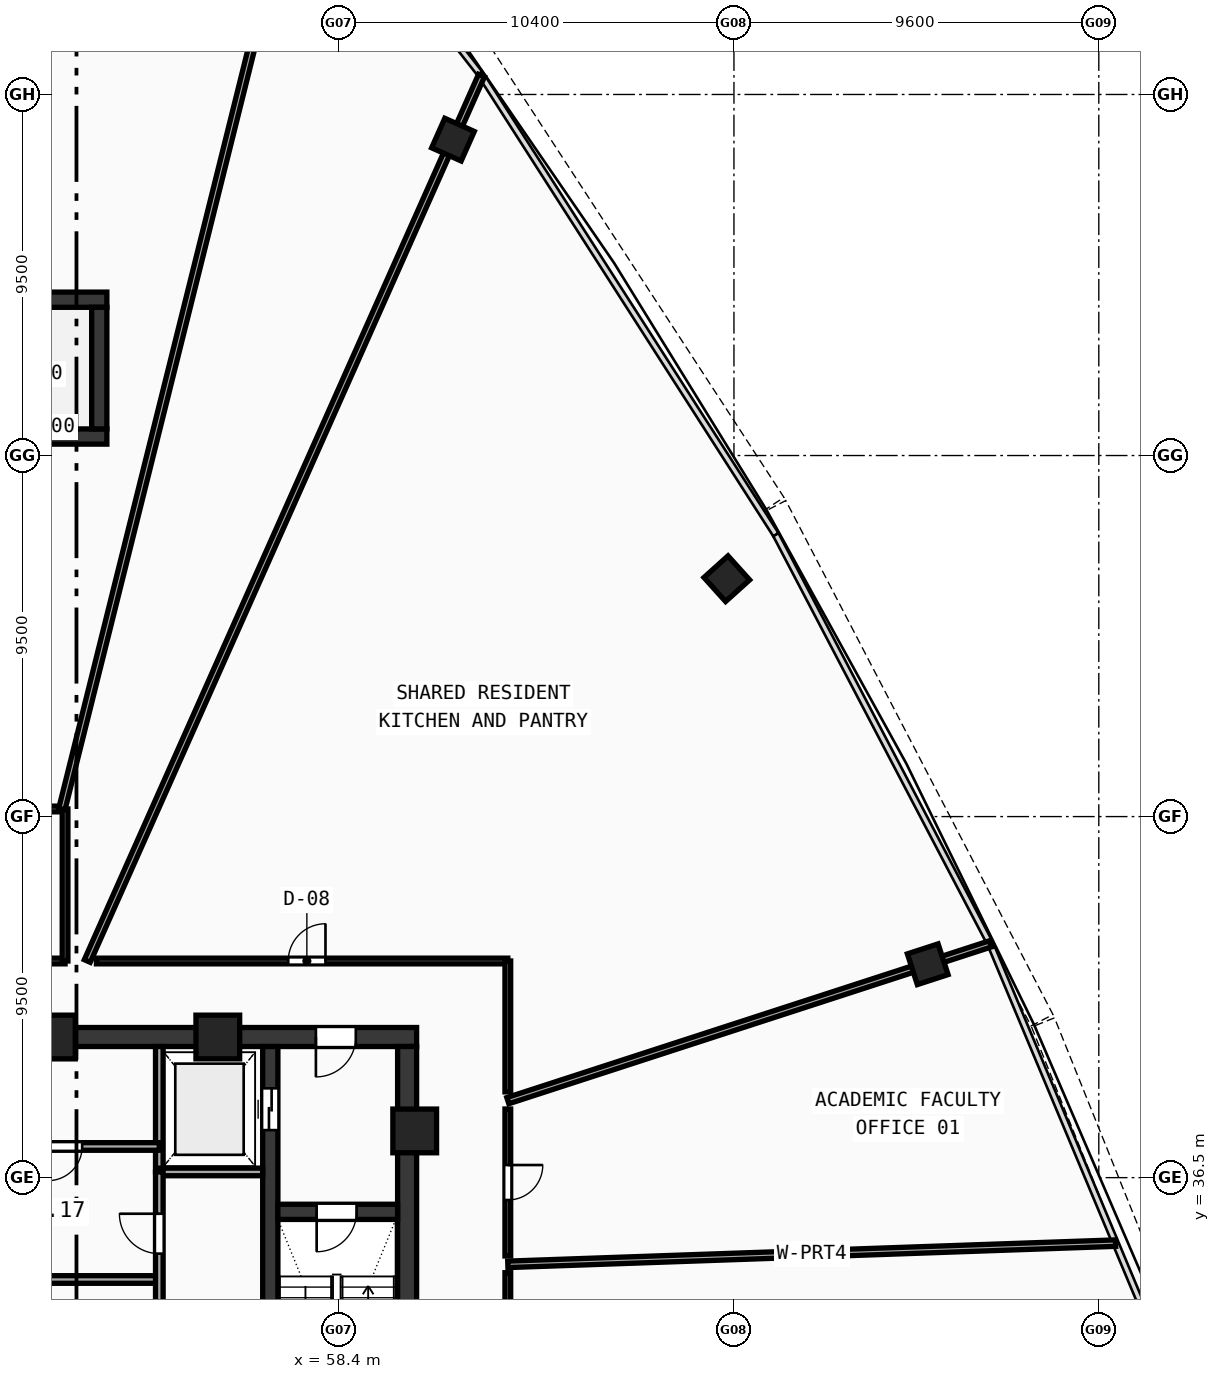
"""IFC4 building model, lengths in metres.
Left out: names, types, materials, properties, quantities, classifications, styles, units other than length and angle.
Written with IfcOpenShell. Run it as: python <this file> out.ifc"""

import sys

from ifc_helpers import new_model, si_unit, direction, frame, frame_2d, origin, origin_with_axes, origin_2d, place, context, subcontext, project, spatial, rectangle, hollow_rectangle, extrude, source, transform, mapped, element, fill, save


model = new_model("IFC4")
c1 = context("Model", 3, precision=1e-05, world=origin(), true_north=direction((0.0, 1.0)))
c2 = subcontext(c1, "Body", "Model", "MODEL_VIEW")
j1 = project(units=[si_unit("LENGTHUNIT", "METRE"), si_unit("PLANEANGLEUNIT", "RADIAN")], contexts=[c1])
p1 = place(None, origin())
s1 = spatial("IfcSite", under=j1, at=p1, CompositionType="ELEMENT")
p2 = place(p1, origin())
s2 = spatial("IfcBuilding", under=s1, at=p2, CompositionType="ELEMENT")
p3 = place(p2, frame((0.0, 0.0, 255.72)))
s3 = spatial("IfcBuildingStorey", under=s2, at=p3, CompositionType="ELEMENT", Elevation=255.72)
p4 = place(p3, frame((49.2, 40.2, 0.0), z_axis=(0.0, 0.0, 1.0), x_axis=(1.0, 0.0, 0.0)))
e1 = element("IfcWall", 1, at=p4, inside=s3, PredefinedType="SHEAR", context=c2, shape_type="SweptSolid", body=[
    extrude(rectangle(XDim=11.25, YDim=0.5, at=frame_2d((5.625, 0.0))), origin(), (0.0, 0.0, 1.0), 3.47),
])
p5 = place(p4, frame((8.6, 0.0, 0.0)))
e2 = element("IfcOpeningElement", 2, at=p5, cuts=e1, PredefinedType="OPENING", context=c2, shape_type="SweptSolid", body=[
    extrude(rectangle(XDim=1.05, YDim=2.1, at=frame_2d((0.525, 1.05))), frame((0.0, 0.26, 0.0), z_axis=(0.0, -1.0, 0.0), x_axis=(1.0, 0.0, 0.0)), (0.0, 0.0, 1.0), 0.52),
])
p6 = place(p3, frame((60.2, 27.75, 0.0), z_axis=(0.0, 0.0, 1.0), x_axis=(0.0, 1.0, 0.0)))
e3 = element("IfcWall", 3, at=p6, inside=s3, PredefinedType="SHEAR", context=c2, shape_type="SweptSolid", body=[
    extrude(rectangle(XDim=12.2, YDim=0.5, at=frame_2d((6.1, 0.0))), origin(), (0.0, 0.0, 1.0), 3.47),
])
p7 = place(p3, frame((56.6, 27.75, 0.0), z_axis=(0.0, 0.0, 1.0), x_axis=(0.0, 1.0, 0.0)))
e4 = element("IfcWall", 4, at=p7, inside=s3, PredefinedType="SHEAR", context=c2, shape_type="SweptSolid", body=[
    extrude(rectangle(XDim=12.2, YDim=0.4, at=frame_2d((6.1, 0.0))), origin(), (0.0, 0.0, 1.0), 3.47),
])
p8 = place(p7, frame((10.0, 0.0, 0.0)))
e5 = element("IfcOpeningElement", 5, at=p8, cuts=e4, PredefinedType="OPENING", context=c2, shape_type="SweptSolid", body=[
    extrude(rectangle(XDim=1.1, YDim=2.1, at=frame_2d((0.55, 1.05))), frame((0.0, 0.21, 0.0), z_axis=(0.0, -1.0, 0.0), x_axis=(1.0, 0.0, 0.0)), (0.0, 0.0, 1.0), 0.42),
])
p9 = place(p3, frame((56.8, 35.6, 0.0), z_axis=(0.0, 0.0, 1.0), x_axis=(1.0, 0.0, 0.0)))
e6 = element("IfcWall", 6, at=p9, inside=s3, PredefinedType="SHEAR", context=c2, shape_type="SweptSolid", body=[
    extrude(rectangle(XDim=3.15, YDim=0.4, at=frame_2d((1.575, 0.0))), origin(), (0.0, 0.0, 1.0), 3.47),
])
p10 = place(p9, frame((1.02, 0.0, 0.0)))
e7 = element("IfcOpeningElement", 7, at=p10, cuts=e6, PredefinedType="OPENING", context=c2, shape_type="SweptSolid", body=[
    extrude(rectangle(XDim=1.05, YDim=2.1, at=frame_2d((0.525, 1.05))), frame((0.0, 0.21, 0.0), z_axis=(0.0, -1.0, 0.0), x_axis=(1.0, 0.0, 0.0)), (0.0, 0.0, 1.0), 0.42),
])
p11 = place(p3, frame((43.8, 59.6, 0.0), z_axis=(0.0, 0.0, 1.0), x_axis=(1.0, 0.0, 0.0)))
e8 = element("IfcWall", 8, at=p11, inside=s3, PredefinedType="SHEAR", context=c2, shape_type="SweptSolid", body=[
    extrude(rectangle(XDim=8.5, YDim=0.4, at=frame_2d((4.25, 0.0))), origin(), (0.0, 0.0, 1.0), 3.47),
])
p12 = place(p3, frame((43.8, 56.0, 0.0), z_axis=(0.0, 0.0, 1.0), x_axis=(1.0, 0.0, 0.0)))
e9 = element("IfcWall", 9, at=p12, inside=s3, PredefinedType="SHEAR", context=c2, shape_type="SweptSolid", body=[
    extrude(rectangle(XDim=8.5, YDim=0.4, at=frame_2d((4.25, 0.0))), origin(), (0.0, 0.0, 1.0), 3.47),
])
p13 = place(p12, frame((0.62, 0.0, 0.0)))
e10 = element("IfcOpeningElement", 10, at=p13, cuts=e9, PredefinedType="OPENING", context=c2, shape_type="SweptSolid", body=[
    extrude(rectangle(XDim=1.05, YDim=2.1, at=frame_2d((0.525, 1.05))), frame((0.0, 0.21, 0.0), z_axis=(0.0, -1.0, 0.0), x_axis=(1.0, 0.0, 0.0)), (0.0, 0.0, 1.0), 0.42),
])
p14 = place(p3, frame((52.1, 56.2, 0.0), z_axis=(0.0, 0.0, 1.0), x_axis=(0.0, 1.0, 0.0)))
e11 = element("IfcWall", 11, at=p14, inside=s3, PredefinedType="SHEAR", context=c2, shape_type="SweptSolid", body=[
    extrude(rectangle(XDim=3.2, YDim=0.4, at=frame_2d((1.6, 0.0))), origin(), (0.0, 0.0, 1.0), 3.47),
])
m1 = source(origin(), c2, "Body", "SweptSolid", [
    extrude(hollow_rectangle(XDim=1.15, YDim=1.15, WallThickness=0.048, at=origin_2d()), origin(), (0.0, 0.0, 1.0), 3.73),
])
for number, where, z_axis, x_axis in (
    (12, (60.4, 37.729, -0.26), (0.0, 0.0, 1.0), (1.0, 0.0, 0.0)),
    (13, (55.219, 40.2, -0.26), (0.0, 0.0, 1.0), (1.0, 0.0, 0.0)),
    (14, (50.894, 40.2, -0.26), (0.0, 0.0, 1.0), (1.0, 0.0, 0.0)),
):
    element("IfcColumn", number, at=place(p3, frame(where, z_axis=z_axis, x_axis=x_axis)), inside=s3, PredefinedType="COLUMN", context=c2, shape_type="MappedRepresentation", body=[
        mapped(m1, transform((0.0, 0.0, 0.0), scale=1.0)),
    ])
m2 = source(origin(), c2, "Body", "SweptSolid", [
    extrude(hollow_rectangle(XDim=0.85, YDim=0.85, WallThickness=0.034, at=origin_2d()), origin(), (0.0, 0.0, 1.0), 3.73),
])
for number, where, z_axis, x_axis in (
    (15, (73.899, 42.115, -0.26), (0.0, 0.0, 1.0), (-0.309, 0.951, 0.0)),
    (16, (68.612, 52.259, -0.26), (0.0, 0.0, 1.0), (-0.669, 0.743, 0.0)),
    (17, (61.407, 63.812, -0.26), (0.0, 0.0, 1.0), (-0.914, 0.407, 0.0)),
):
    element("IfcColumn", number, at=place(p3, frame(where, z_axis=z_axis, x_axis=x_axis)), inside=s3, PredefinedType="COLUMN", context=c2, shape_type="MappedRepresentation", body=[
        mapped(m2, transform((0.0, 0.0, 0.0), scale=1.0)),
    ])
p15 = place(p3, frame((53.68, 36.65, 0.0), z_axis=(0.0, 0.0, 1.0), x_axis=(0.0, 1.0, 0.0)))
e18 = element("IfcWall", 18, at=p15, inside=s3, PredefinedType="SOLIDWALL", context=c2, shape_type="SweptSolid", body=[
    extrude(rectangle(XDim=3.3, YDim=0.2, at=frame_2d((1.65, 0.0))), origin(), (0.0, 0.0, 1.0), 3.47),
])
p16 = place(p3, frame((53.68, 36.65, 0.0), z_axis=(0.0, 0.0, 1.0), x_axis=(1.0, 0.0, 0.0)))
e19 = element("IfcWall", 19, at=p16, inside=s3, PredefinedType="SOLIDWALL", context=c2, shape_type="SweptSolid", body=[
    extrude(rectangle(XDim=2.72, YDim=0.2, at=frame_2d((1.36, 0.0))), origin(), (0.0, 0.0, 1.0), 3.47),
])
p17 = place(p3, frame((48.95, 37.32, 0.0), z_axis=(0.0, 0.0, 1.0), x_axis=(1.0, 0.0, 0.0)))
e20 = element("IfcWall", 20, at=p17, inside=s3, PredefinedType="SOLIDWALL", context=c2, shape_type="SweptSolid", body=[
    extrude(rectangle(XDim=4.73, YDim=0.2, at=frame_2d((2.365, 0.0))), origin(), (0.0, 0.0, 1.0), 3.47),
])
p18 = place(p17, frame((1.8, 0.0, 0.0)))
e21 = element("IfcOpeningElement", 21, at=p18, cuts=e20, PredefinedType="OPENING", context=c2, shape_type="SweptSolid", body=[
    extrude(rectangle(XDim=0.9, YDim=2.1, at=frame_2d((0.45, 1.05))), frame((0.0, 0.11, 0.0), z_axis=(0.0, -1.0, 0.0), x_axis=(1.0, 0.0, 0.0)), (0.0, 0.0, 1.0), 0.22),
])
p19 = place(p3, frame((43.85, 33.82, 0.0), z_axis=(0.0, 0.0, 1.0), x_axis=(1.0, 0.0, 0.0)))
e22 = element("IfcWall", 22, at=p19, inside=s3, PredefinedType="SOLIDWALL", context=c2, shape_type="SweptSolid", body=[
    extrude(rectangle(XDim=9.83, YDim=0.2, at=frame_2d((4.915, 0.0))), origin(), (0.0, 0.0, 1.0), 3.47),
])
p20 = place(p19, frame((4.2, 0.0, 0.0)))
e23 = element("IfcOpeningElement", 23, at=p20, cuts=e22, PredefinedType="OPENING", context=c2, shape_type="SweptSolid", body=[
    extrude(rectangle(XDim=0.9, YDim=2.1, at=frame_2d((0.45, 1.05))), frame((0.0, 0.11, 0.0), z_axis=(0.0, -1.0, 0.0), x_axis=(1.0, 0.0, 0.0)), (0.0, 0.0, 1.0), 0.22),
])
p21 = place(p3, frame((53.68, 27.6, 0.0), z_axis=(0.0, 0.0, 1.0), x_axis=(0.0, 1.0, 0.0)))
e24 = element("IfcWall", 24, at=p21, inside=s3, PredefinedType="SOLIDWALL", context=c2, shape_type="SweptSolid", body=[
    extrude(rectangle(XDim=9.05, YDim=0.2, at=frame_2d((4.525, 0.0))), origin(), (0.0, 0.0, 1.0), 3.47),
])
p22 = place(p21, frame((6.9, 0.0, 0.0)))
e25 = element("IfcOpeningElement", 25, at=p22, cuts=e24, PredefinedType="OPENING", context=c2, shape_type="SweptSolid", body=[
    extrude(rectangle(XDim=1.05, YDim=2.1, at=frame_2d((0.525, 1.05))), frame((0.0, 0.11, 0.0), z_axis=(0.0, -1.0, 0.0), x_axis=(1.0, 0.0, 0.0)), (0.0, 0.0, 1.0), 0.22),
])
p23 = place(p3, frame((45.85, 42.2, 0.0), z_axis=(0.0, 0.0, 1.0), x_axis=(1.0, 0.0, 0.0)))
e26 = element("IfcWall", 26, at=p23, inside=s3, PredefinedType="PARTITIONING", context=c2, shape_type="SweptSolid", body=[
    extrude(rectangle(XDim=5.35, YDim=0.15, at=frame_2d((2.675, 0.0))), origin(), (0.0, 0.0, 1.0), 3.47),
])
p24 = place(p23, frame((1.4, 0.0, 0.0)))
e27 = element("IfcOpeningElement", 27, at=p24, cuts=e26, PredefinedType="OPENING", context=c2, shape_type="SweptSolid", body=[
    extrude(rectangle(XDim=0.94, YDim=2.1, at=frame_2d((0.47, 1.05))), frame((0.0, 0.085, 0.0), z_axis=(0.0, -1.0, 0.0), x_axis=(1.0, 0.0, 0.0)), (0.0, 0.0, 1.0), 0.17),
])
p25 = place(p3, frame((45.85, 46.2, 0.0), z_axis=(0.0, 0.0, 1.0), x_axis=(1.0, 0.0, 0.0)))
e28 = element("IfcWall", 28, at=p25, inside=s3, PredefinedType="PARTITIONING", context=c2, shape_type="SweptSolid", body=[
    extrude(rectangle(XDim=5.35, YDim=0.15, at=frame_2d((2.675, 0.0))), origin(), (0.0, 0.0, 1.0), 3.47),
])
p26 = place(p3, frame((51.2, 42.2, 0.0), z_axis=(0.0, 0.0, 1.0), x_axis=(0.0, 1.0, 0.0)))
e29 = element("IfcWall", 29, at=p26, inside=s3, PredefinedType="PARTITIONING", context=c2, shape_type="SweptSolid", body=[
    extrude(rectangle(XDim=4.0, YDim=0.15, at=frame_2d((2.0, 0.0))), origin(), (0.0, 0.0, 1.0), 3.47),
])
p27 = place(p3, frame((62.85, 34.219, 0.0), z_axis=(0.0, 0.0, 1.0), x_axis=(0.99939049717, 0.034908941063, 0.0)))
e30 = element("IfcWall", 30, at=p27, inside=s3, PredefinedType="PARTITIONING", context=c2, shape_type="SweptSolid", body=[
    extrude(rectangle(XDim=16.001, YDim=0.17, at=frame_2d((8.001, 0.0))), origin(), (0.0, 0.0, 1.0), 2.82),
])
p28 = place(p3, frame((62.85, 38.525, 0.0), z_axis=(0.0, 0.0, 1.0), x_axis=(0.951055435747, 0.30902031994, 0.0)))
e31 = element("IfcWall", 31, at=p28, inside=s3, PredefinedType="PARTITIONING", context=c2, shape_type="SweptSolid", body=[
    extrude(rectangle(XDim=13.349, YDim=0.17, at=frame_2d((6.675, 0.0))), origin(), (0.0, 0.0, 1.0), 2.82),
])
p29 = place(p3, frame((51.784, 42.2, 0.0), z_axis=(0.0, 0.0, 1.0), x_axis=(0.406736188948, 0.913545659833, 0.0)))
e32 = element("IfcWall", 32, at=p29, inside=s3, PredefinedType="PARTITIONING", context=c2, shape_type="SweptSolid", body=[
    extrude(rectangle(XDim=25.501, YDim=0.17, at=frame_2d((12.75, 0.0))), origin(), (0.0, 0.0, 1.0), 2.82),
])
p30 = place(p3, frame((51.117, 46.2, 0.0), z_axis=(0.0, 0.0, 1.0), x_axis=(0.241915360039, 0.970297355751, 0.0)))
e33 = element("IfcWall", 33, at=p30, inside=s3, PredefinedType="PARTITIONING", context=c2, shape_type="SweptSolid", body=[
    extrude(rectangle(XDim=26.119, YDim=0.17, at=frame_2d((13.06, 0.0))), origin(), (0.0, 0.0, 1.0), 2.82),
])
p31 = place(p3, frame((52.025, 42.2, 0.0), z_axis=(0.0, 0.0, 1.0), x_axis=(1.0, 0.0, 0.0)))
e34 = element("IfcWall", 34, at=p31, inside=s3, PredefinedType="PARTITIONING", context=c2, shape_type="SweptSolid", body=[
    extrude(rectangle(XDim=10.825, YDim=0.15, at=frame_2d((5.413, 0.0))), origin(), (0.0, 0.0, 1.0), 2.82),
])
p32 = place(p31, frame((5.047, 0.0, 0.0)))
e35 = element("IfcOpeningElement", 35, at=p32, cuts=e34, PredefinedType="OPENING", context=c2, shape_type="SweptSolid", body=[
    extrude(rectangle(XDim=0.98, YDim=2.12, at=frame_2d((0.49, 1.06))), frame((0.0, 0.085, 0.0), z_axis=(0.0, -1.0, 0.0), x_axis=(1.0, 0.0, 0.0)), (0.0, 0.0, 1.0), 0.17),
])
p33 = place(p3, frame((62.85, 42.2, 0.0), z_axis=(0.0, 0.0, 1.0), x_axis=(0.0, -1.0, 0.0)))
e36 = element("IfcWall", 36, at=p33, inside=s3, PredefinedType="PARTITIONING", context=c2, shape_type="SweptSolid", body=[
    extrude(rectangle(XDim=3.444, YDim=0.15, at=frame_2d((1.722, 0.0))), origin(), (0.0, 0.0, 1.0), 3.12),
])
p34 = place(p3, frame((62.85, 38.305, 0.0), z_axis=(0.0, 0.0, 1.0), x_axis=(0.0, -1.0, 0.0)))
e37 = element("IfcWall", 37, at=p34, inside=s3, PredefinedType="PARTITIONING", context=c2, shape_type="SweptSolid", body=[
    extrude(rectangle(XDim=3.867, YDim=0.15, at=frame_2d((1.933, 0.0))), origin(), (0.0, 0.0, 1.0), 3.47),
])
p35 = place(p34, frame((1.473, 0.0, 0.0)))
e38 = element("IfcOpeningElement", 38, at=p35, cuts=e37, PredefinedType="OPENING", context=c2, shape_type="SweptSolid", body=[
    extrude(rectangle(XDim=0.92, YDim=2.1, at=frame_2d((0.46, 1.05))), frame((0.0, 0.085, 0.0), z_axis=(0.0, -1.0, 0.0), x_axis=(1.0, 0.0, 0.0)), (0.0, 0.0, 1.0), 0.17),
])
p36 = place(p3, frame((62.85, 33.999, 0.0), z_axis=(0.0, 0.0, 1.0), x_axis=(0.0, -1.0, 0.0)))
e39 = element("IfcWall", 39, at=p36, inside=s3, PredefinedType="PARTITIONING", context=c2, shape_type="SweptSolid", body=[
    extrude(rectangle(XDim=2.698, YDim=0.15, at=frame_2d((1.349, 0.0))), origin(), (0.0, 0.0, 1.0), 3.47),
])
p37 = place(p36, frame((0.874, 0.0, 0.0)))
e40 = element("IfcOpeningElement", 40, at=p37, cuts=e39, PredefinedType="OPENING", context=c2, shape_type="SweptSolid", body=[
    extrude(rectangle(XDim=0.98, YDim=2.12, at=frame_2d((0.49, 1.06))), frame((0.0, 0.085, 0.0), z_axis=(0.0, -1.0, 0.0), x_axis=(1.0, 0.0, 0.0)), (0.0, 0.0, 1.0), 0.17),
])
m3 = source(origin(), c2, "Body", "SweptSolid", [
    extrude(rectangle(XDim=1.05, YDim=2.1, at=frame_2d((0.525, 1.05))), frame((0.0, 0.025, 0.0), z_axis=(0.0, -1.0, 0.0), x_axis=(1.0, 0.0, 0.0)), (0.0, 0.0, 1.0), 0.05),
])
p38 = place(p10, frame((1.05, 0.0, 0.0), z_axis=(0.0, 0.0, 1.0), x_axis=(-1.0, 0.0, 0.0)))
e41 = element("IfcDoor", 41, at=p38, inside=s3, OperationType="SINGLE_SWING_RIGHT", PredefinedType="DOOR", context=c2, shape_type="MappedRepresentation", body=[
    mapped(m3, transform((0.0, 0.0, 0.0), scale=1.0)),
])
fill(e7, e41)
p39 = place(p5, frame((1.05, 0.0, 0.0), z_axis=(0.0, 0.0, 1.0), x_axis=(-1.0, 0.0, 0.0)))
e42 = element("IfcDoor", 42, at=p39, inside=s3, OperationType="SINGLE_SWING_RIGHT", PredefinedType="DOOR", context=c2, shape_type="MappedRepresentation", body=[
    mapped(m3, transform((0.0, 0.0, 0.0), scale=1.0)),
])
fill(e2, e42)
m4 = source(origin(), c2, "Body", "SweptSolid", [
    extrude(rectangle(XDim=1.1, YDim=2.1, at=frame_2d((0.55, 1.05))), frame((0.0, 0.025, 0.0), z_axis=(0.0, -1.0, 0.0), x_axis=(1.0, 0.0, 0.0)), (0.0, 0.0, 1.0), 0.05),
])
p40 = place(p8, origin_with_axes())
e43 = element("IfcDoor", 43, at=p40, inside=s3, OperationType="DOUBLE_DOOR_SLIDING", PredefinedType="DOOR", context=c2, shape_type="MappedRepresentation", body=[
    mapped(m4, transform((0.0, 0.0, 0.0), scale=1.0)),
])
fill(e5, e43)
m5 = source(origin(), c2, "Body", "SweptSolid", [
    extrude(rectangle(XDim=0.9, YDim=2.1, at=frame_2d((0.45, 1.05))), frame((0.0, 0.025, 0.0), z_axis=(0.0, -1.0, 0.0), x_axis=(1.0, 0.0, 0.0)), (0.0, 0.0, 1.0), 0.05),
])
p41 = place(p18, frame((0.9, 0.0, 0.0), z_axis=(0.0, 0.0, 1.0), x_axis=(-1.0, 0.0, 0.0)))
e44 = element("IfcDoor", 44, at=p41, inside=s3, OperationType="SINGLE_SWING_RIGHT", PredefinedType="DOOR", context=c2, shape_type="MappedRepresentation", body=[
    mapped(m5, transform((0.0, 0.0, 0.0), scale=1.0)),
])
fill(e21, e44)
p42 = place(p22, origin_with_axes())
e45 = element("IfcDoor", 45, at=p42, inside=s3, OperationType="SINGLE_SWING_RIGHT", PredefinedType="DOOR", context=c2, shape_type="MappedRepresentation", body=[
    mapped(m3, transform((0.0, 0.0, 0.0), scale=1.0)),
])
fill(e25, e45)
m6 = source(origin(), c2, "Body", "SweptSolid", [
    extrude(rectangle(XDim=0.92, YDim=2.1, at=frame_2d((0.46, 1.05))), frame((0.0, 0.025, 0.0), z_axis=(0.0, -1.0, 0.0), x_axis=(1.0, 0.0, 0.0)), (0.0, 0.0, 1.0), 0.05),
])
p43 = place(p35, origin_with_axes())
e46 = element("IfcDoor", 46, at=p43, inside=s3, OperationType="SINGLE_SWING_LEFT", PredefinedType="DOOR", context=c2, shape_type="MappedRepresentation", body=[
    mapped(m6, transform((0.0, 0.0, 0.0), scale=1.0)),
])
fill(e38, e46)
m7 = source(origin(), c2, "Body", "SweptSolid", [
    extrude(rectangle(XDim=0.98, YDim=2.12, at=frame_2d((0.49, 1.06))), frame((0.0, 0.025, 0.0), z_axis=(0.0, -1.0, 0.0), x_axis=(1.0, 0.0, 0.0)), (0.0, 0.0, 1.0), 0.05),
])
p44 = place(p32, origin_with_axes())
e47 = element("IfcDoor", 47, at=p44, inside=s3, OperationType="SINGLE_SWING_RIGHT", PredefinedType="DOOR", context=c2, shape_type="MappedRepresentation", body=[
    mapped(m7, transform((0.0, 0.0, 0.0), scale=1.0)),
])
fill(e35, e47)
save(model, sys.argv[1])
